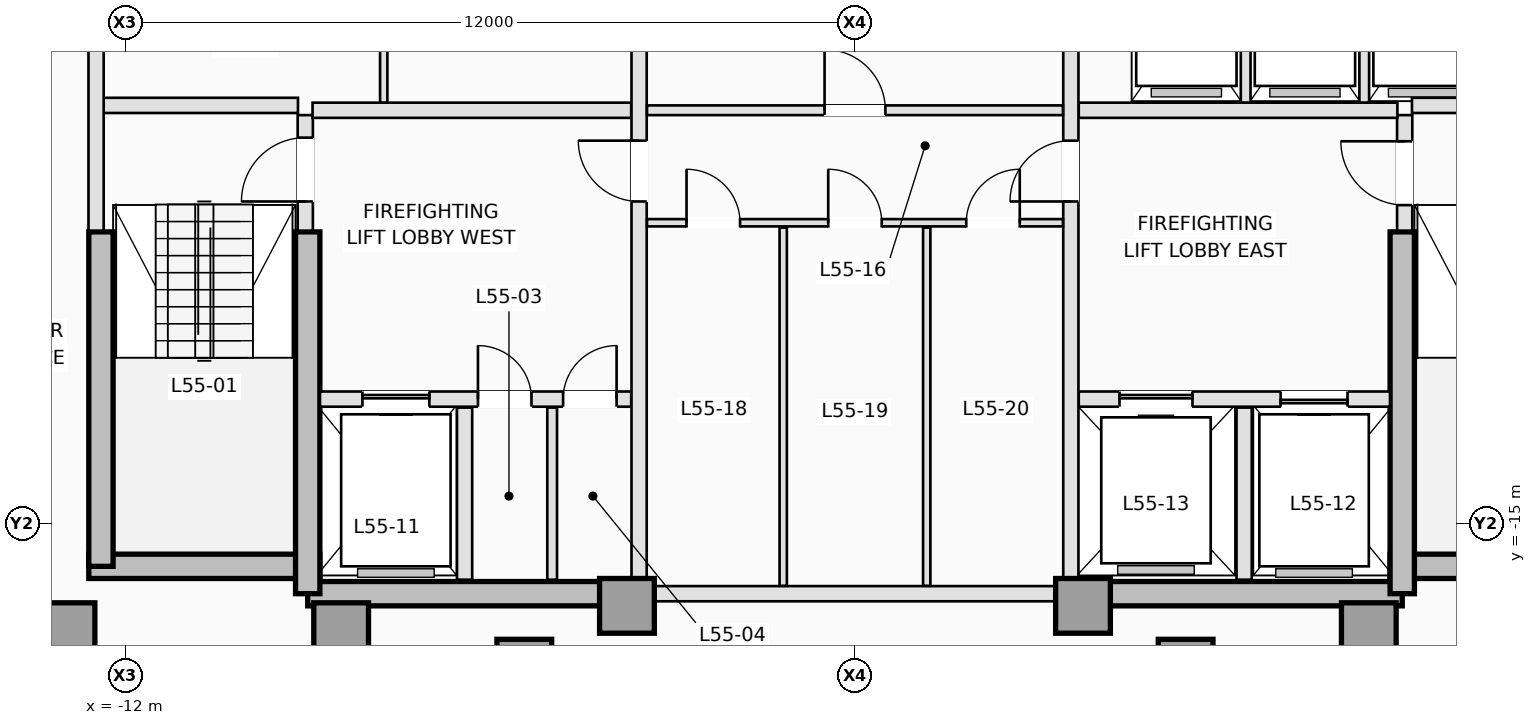
"""IFC4 building model, lengths in metres.
Left out: names, types, materials, properties, quantities, classifications, styles, units other than length and angle.
Written with IfcOpenShell. Run it as: python <this file> out.ifc"""

import sys

from ifc_helpers import new_model, si_unit, direction, frame, frame_2d, origin, origin_2d, place, context, subcontext, project, spatial, rectangle, extrude, element, fill, save


model = new_model("IFC4")
c1 = context("Model", 3, precision=1e-05, world=origin(), true_north=direction((0.0, 1.0)))
c2 = subcontext(c1, "Body", "Model", "MODEL_VIEW")
j1 = project(units=[si_unit("LENGTHUNIT", "METRE"), si_unit("PLANEANGLEUNIT", "RADIAN")], contexts=[c1])
p1 = place(None, origin())
s1 = spatial("IfcSite", under=j1, at=p1, CompositionType="ELEMENT")
p2 = place(p1, origin())
s2 = spatial("IfcBuilding", under=s1, at=p2, CompositionType="ELEMENT")
p3 = place(p2, frame((0.0, 0.0, 200.9)))
s3 = spatial("IfcBuildingStorey", under=s2, at=p3, CompositionType="ELEMENT", Elevation=200.9)
p4 = place(p3, frame((-12.6, -15.7, 0.0), z_axis=(0.0, 0.0, 1.0), x_axis=(1.0, 0.0, 0.0)))
e1 = element("IfcWall", 1, at=p4, inside=s3, PredefinedType="SHEAR", context=c2, shape_type="SweptSolid", body=[
    extrude(rectangle(XDim=3.8, YDim=0.4, at=frame_2d((1.9, 0.0))), origin(), (0.0, 0.0, 1.0), 3.5),
])
for number, where, z_axis, x_axis in (
    (2, (-9.0, -16.15, 0.0), (0.0, 0.0, 1.0), (1.0, 0.0, 0.0)),
    (3, (3.75, -16.15, 0.0), (0.0, 0.0, 1.0), (1.0, 0.0, 0.0)),
):
    element("IfcWall", number, at=place(p3, frame(where, z_axis=z_axis, x_axis=x_axis)), inside=s3, PredefinedType="SHEAR", context=c2, shape_type="SweptSolid", body=[
        extrude(rectangle(XDim=5.25, YDim=0.4, at=frame_2d((2.625, 0.0))), origin(), (0.0, 0.0, 1.0), 3.5),
    ])
p5 = place(p3, frame((8.8, -15.7, 0.0), z_axis=(0.0, 0.0, 1.0), x_axis=(1.0, 0.0, 0.0)))
e4 = element("IfcWall", 4, at=p5, inside=s3, PredefinedType="SHEAR", context=c2, shape_type="SweptSolid", body=[
    extrude(rectangle(XDim=3.8, YDim=0.4, at=frame_2d((1.9, 0.0))), origin(), (0.0, 0.0, 1.0), 3.5),
])
p6 = place(p3, frame((-12.4, -15.7, 0.0), z_axis=(0.0, 0.0, 1.0), x_axis=(0.0, 1.0, 0.0)))
e5 = element("IfcWall", 5, at=p6, inside=s3, PredefinedType="SHEAR", context=c2, shape_type="SweptSolid", body=[
    extrude(rectangle(XDim=5.5, YDim=0.4, at=frame_2d((2.75, 0.0))), origin(), (0.0, 0.0, 1.0), 3.5),
])
for number, where, z_axis, x_axis in (
    (6, (-9.0, -16.15, 0.0), (0.0, 0.0, 1.0), (0.0, 1.0, 0.0)),
    (7, (9.0, -16.15, 0.0), (0.0, 0.0, 1.0), (0.0, 1.0, 0.0)),
):
    element("IfcWall", number, at=place(p3, frame(where, z_axis=z_axis, x_axis=x_axis)), inside=s3, PredefinedType="SHEAR", context=c2, shape_type="SweptSolid", body=[
        extrude(rectangle(XDim=5.95, YDim=0.4, at=frame_2d((2.975, 0.0))), origin(), (0.0, 0.0, 1.0), 3.5),
    ])
for number, where, z_axis, x_axis in (
    (8, (-12.95, -16.75, 0.0), (0.0, 0.0, 1.0), (1.0, 0.0, 0.0)),
    (9, (-8.45, -16.75, 0.0), (0.0, 0.0, 1.0), (1.0, 0.0, 0.0)),
    (10, (-3.75, -16.35, 0.0), (0.0, 0.0, 1.0), (1.0, 0.0, 0.0)),
    (11, (3.75, -16.35, 0.0), (0.0, 0.0, 1.0), (1.0, 0.0, 0.0)),
    (12, (8.45, -16.75, 0.0), (0.0, 0.0, 1.0), (1.0, 0.0, 0.0)),
    (13, (-5.438, -17.35, 0.0), (0.0, 0.0, 1.0), (0.0, 1.0, 0.0)),
    (14, (5.438, -17.35, 0.0), (0.0, 0.0, 1.0), (0.0, 1.0, 0.0)),
):
    element("IfcColumn", number, at=place(p3, frame(where, z_axis=z_axis, x_axis=x_axis)), inside=s3, PredefinedType="COLUMN", context=c2, shape_type="SweptSolid", body=[
        extrude(rectangle(XDim=0.9, YDim=0.9, at=origin_2d()), origin(), (0.0, 0.0, 1.0), 3.5),
    ])
p7 = place(p3, frame((-9.04, -10.18, 0.0), z_axis=(0.0, 0.0, 1.0), x_axis=(0.0, 1.0, 0.0)))
e15 = element("IfcWall", 15, at=p7, inside=s3, PredefinedType="PARTITIONING", context=c2, shape_type="SweptSolid", body=[
    extrude(rectangle(XDim=1.9, YDim=0.25, at=frame_2d((0.95, 0.0))), origin(), (0.0, 0.0, 1.0), 3.25),
])
p8 = place(p7, frame((0.48, 0.0, 0.0)))
e16 = element("IfcOpeningElement", 16, at=p8, cuts=e15, PredefinedType="OPENING", context=c2, shape_type="SweptSolid", body=[
    extrude(rectangle(XDim=1.05, YDim=2.15, at=frame_2d((0.525, 1.075))), frame((0.0, 0.135, 0.0), z_axis=(0.0, -1.0, 0.0), x_axis=(1.0, 0.0, 0.0)), (0.0, 0.0, 1.0), 0.27),
])
p9 = place(p3, frame((9.04, -10.18, 0.0), z_axis=(0.0, 0.0, 1.0), x_axis=(0.0, 1.0, 0.0)))
e17 = element("IfcWall", 17, at=p9, inside=s3, PredefinedType="PARTITIONING", context=c2, shape_type="SweptSolid", body=[
    extrude(rectangle(XDim=1.9, YDim=0.25, at=frame_2d((0.95, 0.0))), origin(), (0.0, 0.0, 1.0), 3.25),
])
p10 = place(p9, frame((0.42, 0.0, 0.0)))
e18 = element("IfcOpeningElement", 18, at=p10, cuts=e17, PredefinedType="OPENING", context=c2, shape_type="SweptSolid", body=[
    extrude(rectangle(XDim=1.05, YDim=2.15, at=frame_2d((0.525, 1.075))), frame((0.0, 0.135, 0.0), z_axis=(0.0, -1.0, 0.0), x_axis=(1.0, 0.0, 0.0)), (0.0, 0.0, 1.0), 0.27),
])
for number, where, z_axis, x_axis in (
    (19, (-12.38, -8.12, 0.0), (0.0, 0.0, 1.0), (1.0, 0.0, 0.0)),
    (20, (9.16, -8.12, 0.0), (0.0, 0.0, 1.0), (1.0, 0.0, 0.0)),
):
    element("IfcWall", number, at=place(p3, frame(where, z_axis=z_axis, x_axis=x_axis)), inside=s3, PredefinedType="PARTITIONING", context=c2, shape_type="SweptSolid", body=[
        extrude(rectangle(XDim=3.22, YDim=0.25, at=frame_2d((1.61, 0.0))), origin(), (0.0, 0.0, 1.0), 3.25),
    ])
p11 = place(p3, frame((-12.48, -10.18, 0.0), z_axis=(0.0, 0.0, 1.0), x_axis=(0.0, 1.0, 0.0)))
e21 = element("IfcWall", 21, at=p11, inside=s3, PredefinedType="PARTITIONING", context=c2, shape_type="SweptSolid", body=[
    extrude(rectangle(XDim=4.84, YDim=0.25, at=frame_2d((2.42, 0.0))), origin(), (0.0, 0.0, 1.0), 3.25),
])
p12 = place(p3, frame((-8.798, -12.95, 0.0), z_axis=(0.0, 0.0, 1.0), x_axis=(1.0, 0.0, 0.0)))
e22 = element("IfcWall", 22, at=p12, inside=s3, PredefinedType="PARTITIONING", context=c2, shape_type="SweptSolid", body=[
    extrude(rectangle(XDim=5.118, YDim=0.25, at=frame_2d((2.559, 0.0))), origin(), (0.0, 0.0, 1.0), 3.25),
])
p13 = place(p12, frame((0.698, 0.0, 0.0)))
e23 = element("IfcOpeningElement", 23, at=p13, cuts=e22, PredefinedType="OPENING", context=c2, shape_type="SweptSolid", body=[
    extrude(rectangle(XDim=1.1, YDim=2.15, at=frame_2d((0.55, 1.075))), frame((0.0, 0.135, 0.0), z_axis=(0.0, -1.0, 0.0), x_axis=(1.0, 0.0, 0.0)), (0.0, 0.0, 1.0), 0.27),
])
p14 = place(p12, frame((2.598, 0.0, 0.0)))
e24 = element("IfcOpeningElement", 24, at=p14, cuts=e22, PredefinedType="OPENING", context=c2, shape_type="SweptSolid", body=[
    extrude(rectangle(XDim=0.88, YDim=2.1, at=frame_2d((0.44, 1.05))), frame((0.0, 0.135, 0.0), z_axis=(0.0, -1.0, 0.0), x_axis=(1.0, 0.0, 0.0)), (0.0, 0.0, 1.0), 0.27),
])
p15 = place(p12, frame((3.998, 0.0, 0.0)))
e25 = element("IfcOpeningElement", 25, at=p15, cuts=e22, PredefinedType="OPENING", context=c2, shape_type="SweptSolid", body=[
    extrude(rectangle(XDim=0.88, YDim=2.1, at=frame_2d((0.44, 1.05))), frame((0.0, 0.135, 0.0), z_axis=(0.0, -1.0, 0.0), x_axis=(1.0, 0.0, 0.0)), (0.0, 0.0, 1.0), 0.27),
])
p16 = place(p3, frame((3.68, -12.95, 0.0), z_axis=(0.0, 0.0, 1.0), x_axis=(1.0, 0.0, 0.0)))
e26 = element("IfcWall", 26, at=p16, inside=s3, PredefinedType="PARTITIONING", context=c2, shape_type="SweptSolid", body=[
    extrude(rectangle(XDim=5.118, YDim=0.25, at=frame_2d((2.559, 0.0))), origin(), (0.0, 0.0, 1.0), 3.25),
])
p17 = place(p16, frame((3.32, 0.0, 0.0)))
e27 = element("IfcOpeningElement", 27, at=p17, cuts=e26, PredefinedType="OPENING", context=c2, shape_type="SweptSolid", body=[
    extrude(rectangle(XDim=1.1, YDim=2.15, at=frame_2d((0.55, 1.075))), frame((0.0, 0.135, 0.0), z_axis=(0.0, -1.0, 0.0), x_axis=(1.0, 0.0, 0.0)), (0.0, 0.0, 1.0), 0.27),
])
p18 = place(p16, frame((0.67, 0.0, 0.0)))
e28 = element("IfcOpeningElement", 28, at=p18, cuts=e26, PredefinedType="OPENING", context=c2, shape_type="SweptSolid", body=[
    extrude(rectangle(XDim=1.2, YDim=2.15, at=frame_2d((0.6, 1.075))), frame((0.0, 0.135, 0.0), z_axis=(0.0, -1.0, 0.0), x_axis=(1.0, 0.0, 0.0)), (0.0, 0.0, 1.0), 0.27),
])
p19 = place(p3, frame((-6.42, -15.92, 0.0), z_axis=(0.0, 0.0, 1.0), x_axis=(0.0, 1.0, 0.0)))
e29 = element("IfcWall", 29, at=p19, inside=s3, PredefinedType="PARTITIONING", context=c2, shape_type="SweptSolid", body=[
    extrude(rectangle(XDim=2.83, YDim=0.25, at=frame_2d((1.415, 0.0))), origin(), (0.0, 0.0, 1.0), 3.25),
])
p20 = place(p3, frame((-4.98, -15.92, 0.0), z_axis=(0.0, 0.0, 1.0), x_axis=(0.0, 1.0, 0.0)))
e30 = element("IfcWall", 30, at=p20, inside=s3, PredefinedType="PARTITIONING", context=c2, shape_type="SweptSolid", body=[
    extrude(rectangle(XDim=2.83, YDim=0.16, at=frame_2d((1.415, 0.0))), origin(), (0.0, 0.0, 1.0), 3.25),
])
p21 = place(p3, frame((6.4, -15.92, 0.0), z_axis=(0.0, 0.0, 1.0), x_axis=(0.0, 1.0, 0.0)))
e31 = element("IfcWall", 31, at=p21, inside=s3, PredefinedType="PARTITIONING", context=c2, shape_type="SweptSolid", body=[
    extrude(rectangle(XDim=2.83, YDim=0.25, at=frame_2d((1.415, 0.0))), origin(), (0.0, 0.0, 1.0), 3.25),
])
for number, where, z_axis, x_axis in (
    (32, (-8.92, -8.2, 0.0), (0.0, 0.0, 1.0), (1.0, 0.0, 0.0)),
    (33, (3.68, -8.2, 0.0), (0.0, 0.0, 1.0), (1.0, 0.0, 0.0)),
):
    element("IfcWall", number, at=place(p3, frame(where, z_axis=z_axis, x_axis=x_axis)), inside=s3, PredefinedType="PARTITIONING", context=c2, shape_type="SweptSolid", body=[
        extrude(rectangle(XDim=5.24, YDim=0.25, at=frame_2d((2.62, 0.0))), origin(), (0.0, 0.0, 1.0), 3.25),
    ])
p22 = place(p3, frame((-3.55, -15.898, 0.0), z_axis=(0.0, 0.0, 1.0), x_axis=(0.0, 1.0, 0.0)))
e34 = element("IfcWall", 34, at=p22, inside=s3, PredefinedType="PARTITIONING", context=c2, shape_type="SweptSolid", body=[
    extrude(rectangle(XDim=10.558, YDim=0.25, at=frame_2d((5.279, 0.0))), origin(), (0.0, 0.0, 1.0), 3.25),
])
p23 = place(p22, frame((6.198, 0.0, 0.0)))
e35 = element("IfcOpeningElement", 35, at=p23, cuts=e34, PredefinedType="OPENING", context=c2, shape_type="SweptSolid", body=[
    extrude(rectangle(XDim=1.0, YDim=2.15, at=frame_2d((0.5, 1.075))), frame((0.0, 0.135, 0.0), z_axis=(0.0, -1.0, 0.0), x_axis=(1.0, 0.0, 0.0)), (0.0, 0.0, 1.0), 0.27),
])
p24 = place(p3, frame((3.55, -15.898, 0.0), z_axis=(0.0, 0.0, 1.0), x_axis=(0.0, 1.0, 0.0)))
e36 = element("IfcWall", 36, at=p24, inside=s3, PredefinedType="PARTITIONING", context=c2, shape_type="SweptSolid", body=[
    extrude(rectangle(XDim=10.558, YDim=0.25, at=frame_2d((5.279, 0.0))), origin(), (0.0, 0.0, 1.0), 3.25),
])
p25 = place(p24, frame((6.198, 0.0, 0.0)))
e37 = element("IfcOpeningElement", 37, at=p25, cuts=e36, PredefinedType="OPENING", context=c2, shape_type="SweptSolid", body=[
    extrude(rectangle(XDim=1.0, YDim=2.15, at=frame_2d((0.5, 1.075))), frame((0.0, 0.135, 0.0), z_axis=(0.0, -1.0, 0.0), x_axis=(1.0, 0.0, 0.0)), (0.0, 0.0, 1.0), 0.27),
])
p26 = place(p3, frame((-7.75, -8.073, 0.0), z_axis=(0.0, 0.0, 1.0), x_axis=(0.0, 1.0, 0.0)))
e38 = element("IfcWall", 38, at=p26, inside=s3, PredefinedType="PARTITIONING", context=c2, shape_type="SweptSolid", body=[
    extrude(rectangle(XDim=2.733, YDim=0.12, at=frame_2d((1.366, 0.0))), origin(), (0.0, 0.0, 1.0), 3.25),
])
for number, where, z_axis, x_axis in (
    (39, (6.425, -8.073, 0.0), (0.0, 0.0, 1.0), (0.0, 1.0, 0.0)),
    (40, (8.375, -8.073, 0.0), (0.0, 0.0, 1.0), (0.0, 1.0, 0.0)),
):
    element("IfcWall", number, at=place(p3, frame(where, z_axis=z_axis, x_axis=x_axis)), inside=s3, PredefinedType="PARTITIONING", context=c2, shape_type="SweptSolid", body=[
        extrude(rectangle(XDim=2.733, YDim=0.16, at=frame_2d((1.366, 0.0))), origin(), (0.0, 0.0, 1.0), 3.25),
    ])
p27 = place(p3, frame((-3.298, -16.15, 0.0), z_axis=(0.0, 0.0, 1.0), x_axis=(1.0, 0.0, 0.0)))
e41 = element("IfcWall", 41, at=p27, inside=s3, PredefinedType="PARTITIONING", context=c2, shape_type="SweptSolid", body=[
    extrude(rectangle(XDim=6.596, YDim=0.25, at=frame_2d((3.298, 0.0))), origin(), (0.0, 0.0, 1.0), 2.45),
])
p28 = place(p3, frame((-3.42, -8.2, 0.0), z_axis=(0.0, 0.0, 1.0), x_axis=(1.0, 0.0, 0.0)))
e42 = element("IfcWall", 42, at=p28, inside=s3, PredefinedType="PARTITIONING", context=c2, shape_type="SweptSolid", body=[
    extrude(rectangle(XDim=6.84, YDim=0.16, at=frame_2d((3.42, 0.0))), origin(), (0.0, 0.0, 1.0), 3.25),
])
p29 = place(p28, frame((2.92, 0.0, 0.0)))
e43 = element("IfcOpeningElement", 43, at=p29, cuts=e42, PredefinedType="OPENING", context=c2, shape_type="SweptSolid", body=[
    extrude(rectangle(XDim=1.0, YDim=2.15, at=frame_2d((0.5, 1.075))), frame((0.0, 0.09, 0.0), z_axis=(0.0, -1.0, 0.0), x_axis=(1.0, 0.0, 0.0)), (0.0, 0.0, 1.0), 0.18),
])
p30 = place(p3, frame((-3.42, -10.05, 0.0), z_axis=(0.0, 0.0, 1.0), x_axis=(1.0, 0.0, 0.0)))
e44 = element("IfcWall", 44, at=p30, inside=s3, PredefinedType="PARTITIONING", context=c2, shape_type="SweptSolid", body=[
    extrude(rectangle(XDim=6.84, YDim=0.12, at=frame_2d((3.42, 0.0))), origin(), (0.0, 0.0, 1.0), 3.25),
])
p31 = place(p30, frame((0.65, 0.0, 0.0)))
e45 = element("IfcOpeningElement", 45, at=p31, cuts=e44, PredefinedType="OPENING", context=c2, shape_type="SweptSolid", body=[
    extrude(rectangle(XDim=0.88, YDim=2.12, at=frame_2d((0.44, 1.06))), frame((0.0, 0.07, 0.0), z_axis=(0.0, -1.0, 0.0), x_axis=(1.0, 0.0, 0.0)), (0.0, 0.0, 1.0), 0.14),
])
p32 = place(p30, frame((2.98, 0.0, 0.0)))
e46 = element("IfcOpeningElement", 46, at=p32, cuts=e44, PredefinedType="OPENING", context=c2, shape_type="SweptSolid", body=[
    extrude(rectangle(XDim=0.88, YDim=2.12, at=frame_2d((0.44, 1.06))), frame((0.0, 0.07, 0.0), z_axis=(0.0, -1.0, 0.0), x_axis=(1.0, 0.0, 0.0)), (0.0, 0.0, 1.0), 0.14),
])
p33 = place(p30, frame((5.25, 0.0, 0.0)))
e47 = element("IfcOpeningElement", 47, at=p33, cuts=e44, PredefinedType="OPENING", context=c2, shape_type="SweptSolid", body=[
    extrude(rectangle(XDim=0.88, YDim=2.12, at=frame_2d((0.44, 1.06))), frame((0.0, 0.07, 0.0), z_axis=(0.0, -1.0, 0.0), x_axis=(1.0, 0.0, 0.0)), (0.0, 0.0, 1.0), 0.14),
])
for number, where, z_axis, x_axis in (
    (48, (-1.18, -16.02, 0.0), (0.0, 0.0, 1.0), (0.0, 1.0, 0.0)),
    (49, (1.18, -16.02, 0.0), (0.0, 0.0, 1.0), (0.0, 1.0, 0.0)),
):
    element("IfcWall", number, at=place(p3, frame(where, z_axis=z_axis, x_axis=x_axis)), inside=s3, PredefinedType="PARTITIONING", context=c2, shape_type="SweptSolid", body=[
        extrude(rectangle(XDim=5.89, YDim=0.12, at=frame_2d((2.945, 0.0))), origin(), (0.0, 0.0, 1.0), 3.25),
    ])
p34 = place(p13, origin())
e50 = element("IfcDoor", 50, at=p34, inside=s3, OperationType="SLIDING_TO_LEFT", PredefinedType="DOOR", context=c2, shape_type="SweptSolid", body=[
    extrude(rectangle(XDim=1.1, YDim=2.15, at=frame_2d((0.55, 1.075))), frame((0.0, 0.025, 0.0), z_axis=(0.0, -1.0, 0.0), x_axis=(1.0, 0.0, 0.0)), (0.0, 0.0, 1.0), 0.05),
])
fill(e23, e50)
p35 = place(p17, origin())
e51 = element("IfcDoor", 51, at=p35, inside=s3, OperationType="SLIDING_TO_RIGHT", PredefinedType="DOOR", context=c2, shape_type="SweptSolid", body=[
    extrude(rectangle(XDim=1.1, YDim=2.15, at=frame_2d((0.55, 1.075))), frame((0.0, 0.025, 0.0), z_axis=(0.0, -1.0, 0.0), x_axis=(1.0, 0.0, 0.0)), (0.0, 0.0, 1.0), 0.05),
])
fill(e27, e51)
p36 = place(p18, origin())
e52 = element("IfcDoor", 52, at=p36, inside=s3, OperationType="SLIDING_TO_LEFT", PredefinedType="DOOR", context=c2, shape_type="SweptSolid", body=[
    extrude(rectangle(XDim=1.2, YDim=2.15, at=frame_2d((0.6, 1.075))), frame((0.0, 0.025, 0.0), z_axis=(0.0, -1.0, 0.0), x_axis=(1.0, 0.0, 0.0)), (0.0, 0.0, 1.0), 0.05),
])
fill(e28, e52)
p37 = place(p8, origin())
e53 = element("IfcDoor", 53, at=p37, inside=s3, OperationType="SINGLE_SWING_LEFT", PredefinedType="DOOR", context=c2, shape_type="SweptSolid", body=[
    extrude(rectangle(XDim=1.05, YDim=2.15, at=frame_2d((0.525, 1.075))), frame((0.0, 0.025, 0.0), z_axis=(0.0, -1.0, 0.0), x_axis=(1.0, 0.0, 0.0)), (0.0, 0.0, 1.0), 0.05),
])
fill(e16, e53)
p38 = place(p10, origin())
e54 = element("IfcDoor", 54, at=p38, inside=s3, OperationType="SINGLE_SWING_RIGHT", PredefinedType="DOOR", context=c2, shape_type="SweptSolid", body=[
    extrude(rectangle(XDim=1.05, YDim=2.15, at=frame_2d((0.525, 1.075))), frame((0.0, 0.025, 0.0), z_axis=(0.0, -1.0, 0.0), x_axis=(1.0, 0.0, 0.0)), (0.0, 0.0, 1.0), 0.05),
])
fill(e18, e54)
p39 = place(p14, origin())
e55 = element("IfcDoor", 55, at=p39, inside=s3, OperationType="SINGLE_SWING_LEFT", PredefinedType="TRAPDOOR", context=c2, shape_type="SweptSolid", body=[
    extrude(rectangle(XDim=0.88, YDim=2.1, at=frame_2d((0.44, 1.05))), frame((0.0, 0.025, 0.0), z_axis=(0.0, -1.0, 0.0), x_axis=(1.0, 0.0, 0.0)), (0.0, 0.0, 1.0), 0.05),
])
fill(e24, e55)
p40 = place(p15, origin())
e56 = element("IfcDoor", 56, at=p40, inside=s3, OperationType="SINGLE_SWING_RIGHT", PredefinedType="TRAPDOOR", context=c2, shape_type="SweptSolid", body=[
    extrude(rectangle(XDim=0.88, YDim=2.1, at=frame_2d((0.44, 1.05))), frame((0.0, 0.025, 0.0), z_axis=(0.0, -1.0, 0.0), x_axis=(1.0, 0.0, 0.0)), (0.0, 0.0, 1.0), 0.05),
])
fill(e25, e56)
p41 = place(p23, origin())
e57 = element("IfcDoor", 57, at=p41, inside=s3, OperationType="SINGLE_SWING_RIGHT", PredefinedType="DOOR", context=c2, shape_type="SweptSolid", body=[
    extrude(rectangle(XDim=1.0, YDim=2.15, at=frame_2d((0.5, 1.075))), frame((0.0, 0.025, 0.0), z_axis=(0.0, -1.0, 0.0), x_axis=(1.0, 0.0, 0.0)), (0.0, 0.0, 1.0), 0.05),
])
fill(e35, e57)
p42 = place(p25, origin())
e58 = element("IfcDoor", 58, at=p42, inside=s3, OperationType="SINGLE_SWING_LEFT", PredefinedType="DOOR", context=c2, shape_type="SweptSolid", body=[
    extrude(rectangle(XDim=1.0, YDim=2.15, at=frame_2d((0.5, 1.075))), frame((0.0, 0.025, 0.0), z_axis=(0.0, -1.0, 0.0), x_axis=(1.0, 0.0, 0.0)), (0.0, 0.0, 1.0), 0.05),
])
fill(e37, e58)
p43 = place(p29, origin())
e59 = element("IfcDoor", 59, at=p43, inside=s3, OperationType="SINGLE_SWING_LEFT", PredefinedType="DOOR", context=c2, shape_type="SweptSolid", body=[
    extrude(rectangle(XDim=1.0, YDim=2.15, at=frame_2d((0.5, 1.075))), frame((0.0, 0.025, 0.0), z_axis=(0.0, -1.0, 0.0), x_axis=(1.0, 0.0, 0.0)), (0.0, 0.0, 1.0), 0.05),
])
fill(e43, e59)
p44 = place(p31, origin())
e60 = element("IfcDoor", 60, at=p44, inside=s3, OperationType="SINGLE_SWING_LEFT", PredefinedType="DOOR", context=c2, shape_type="SweptSolid", body=[
    extrude(rectangle(XDim=0.88, YDim=2.12, at=frame_2d((0.44, 1.06))), frame((0.0, 0.025, 0.0), z_axis=(0.0, -1.0, 0.0), x_axis=(1.0, 0.0, 0.0)), (0.0, 0.0, 1.0), 0.05),
])
fill(e45, e60)
p45 = place(p32, origin())
e61 = element("IfcDoor", 61, at=p45, inside=s3, OperationType="SINGLE_SWING_LEFT", PredefinedType="DOOR", context=c2, shape_type="SweptSolid", body=[
    extrude(rectangle(XDim=0.88, YDim=2.12, at=frame_2d((0.44, 1.06))), frame((0.0, 0.025, 0.0), z_axis=(0.0, -1.0, 0.0), x_axis=(1.0, 0.0, 0.0)), (0.0, 0.0, 1.0), 0.05),
])
fill(e46, e61)
p46 = place(p33, origin())
e62 = element("IfcDoor", 62, at=p46, inside=s3, OperationType="SINGLE_SWING_RIGHT", PredefinedType="DOOR", context=c2, shape_type="SweptSolid", body=[
    extrude(rectangle(XDim=0.88, YDim=2.12, at=frame_2d((0.44, 1.06))), frame((0.0, 0.025, 0.0), z_axis=(0.0, -1.0, 0.0), x_axis=(1.0, 0.0, 0.0)), (0.0, 0.0, 1.0), 0.05),
])
fill(e47, e62)
save(model, sys.argv[1])
